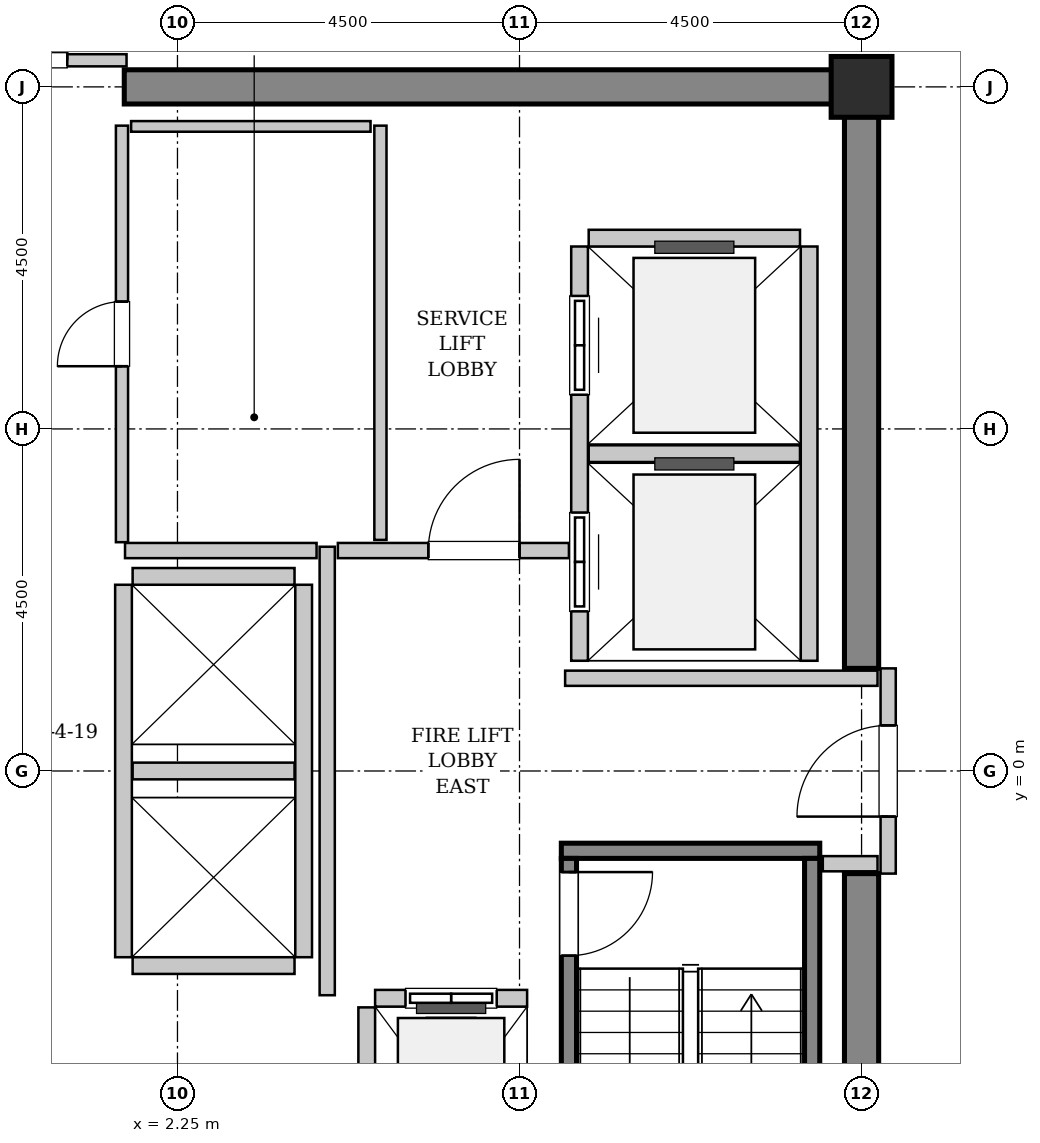
"""IFC4 building model, lengths in metres.
Left out: names, types, materials, properties, quantities, classifications, styles, units other than length and angle.
Written with IfcOpenShell. Run it as: python <this file> out.ifc"""

import sys

from ifc_helpers import new_model, si_unit, direction, frame, frame_2d, origin, origin_2d, place, context, subcontext, project, spatial, rectangle, hollow_rectangle, extrude, source, transform, mapped, element, fill, save


model = new_model("IFC4")
c1 = context("Model", 3, precision=1e-05, world=origin(), true_north=direction((0.0, 1.0)))
c2 = subcontext(c1, "Body", "Model", "MODEL_VIEW")
j1 = project(units=[si_unit("LENGTHUNIT", "METRE"), si_unit("PLANEANGLEUNIT", "RADIAN")], contexts=[c1])
p1 = place(None, origin())
s1 = spatial("IfcSite", under=j1, at=p1, CompositionType="ELEMENT")
p2 = place(p1, origin())
s2 = spatial("IfcBuilding", under=s1, at=p2, CompositionType="ELEMENT")
p3 = place(p2, frame((0.0, 0.0, 225.6)))
s3 = spatial("IfcBuildingStorey", under=s2, at=p3, CompositionType="ELEMENT", Elevation=225.6)
m1 = source(origin(), c2, "Body", "SweptSolid", [
    extrude(rectangle(XDim=9.925, YDim=0.45, at=frame_2d((4.962, 0.0))), origin(), (0.0, 0.0, 1.0), 3.8),
])
p4 = place(p3, frame((1.55, 9.0, 0.0), z_axis=(0.0, 0.0, 1.0), x_axis=(1.0, 0.0, 0.0)))
e1 = element("IfcWall", 1, at=p4, inside=s3, PredefinedType="SHEAR", context=c2, shape_type="MappedRepresentation", body=[
    mapped(m1, transform((0.0, 0.0, 0.0), x_axis=(1.0, 0.0, 0.0), y_axis=(0.0, 1.0, 0.0), z_axis=(0.0, 0.0, 1.0), scale=1.0)),
])
m2 = source(origin(), c2, "Body", "SweptSolid", [
    extrude(rectangle(XDim=7.425, YDim=0.45, at=frame_2d((3.712, 0.0))), origin(), (0.0, 0.0, 1.0), 3.8),
])
for number, where, z_axis, x_axis in (
    (2, (11.25, -8.775, 0.0), (0.0, 0.0, 1.0), (0.0, 1.0, 0.0)),
    (3, (11.25, 1.35, 0.0), (0.0, 0.0, 1.0), (0.0, 1.0, 0.0)),
):
    element("IfcWall", number, at=place(p3, frame(where, z_axis=z_axis, x_axis=x_axis)), inside=s3, PredefinedType="SHEAR", context=c2, shape_type="MappedRepresentation", body=[
        mapped(m2, transform((0.0, 0.0, 0.0), x_axis=(1.0, 0.0, 0.0), y_axis=(0.0, 1.0, 0.0), z_axis=(0.0, 0.0, 1.0), scale=1.0)),
    ])
m3 = source(origin(), c2, "Body", "SweptSolid", [
    extrude(hollow_rectangle(XDim=0.8, YDim=0.8, WallThickness=0.04, InnerFilletRadius=0.04, OuterFilletRadius=0.08, at=origin_2d()), origin(), (0.0, 0.0, 1.0), 3.8),
])
p5 = place(p3, frame((11.25, 9.0, 0.0), z_axis=(0.0, 0.0, 1.0), x_axis=(1.0, 0.0, 0.0)))
e4 = element("IfcColumn", 4, at=p5, inside=s3, PredefinedType="COLUMN", context=c2, shape_type="MappedRepresentation", body=[
    mapped(m3, transform((0.0, 0.0, 0.0), x_axis=(1.0, 0.0, 0.0), y_axis=(0.0, 1.0, 0.0), z_axis=(0.0, 0.0, 1.0), scale=1.0)),
])
m4 = source(origin(), c2, "Body", "SweptSolid", [
    extrude(rectangle(XDim=3.4, YDim=0.2, at=frame_2d((1.7, 0.0))), origin(), (0.0, 0.0, 1.0), 3.8),
])
p6 = place(p3, frame((7.3, -1.05, 0.0), z_axis=(0.0, 0.0, 1.0), x_axis=(1.0, 0.0, 0.0)))
e5 = element("IfcWall", 5, at=p6, inside=s3, PredefinedType="SOLIDWALL", context=c2, shape_type="MappedRepresentation", body=[
    mapped(m4, transform((0.0, 0.0, 0.0), x_axis=(1.0, 0.0, 0.0), y_axis=(0.0, 1.0, 0.0), z_axis=(0.0, 0.0, 1.0), scale=1.0)),
])
m5 = source(origin(), c2, "Body", "SweptSolid", [
    extrude(rectangle(XDim=7.1, YDim=0.2, at=frame_2d((3.55, 0.0))), origin(), (0.0, 0.0, 1.0), 3.8),
])
p7 = place(p3, frame((7.4, -1.15, 0.0), z_axis=(0.0, 0.0, 1.0), x_axis=(0.0, -1.0, 0.0)))
e6 = element("IfcWall", 6, at=p7, inside=s3, PredefinedType="SOLIDWALL", context=c2, shape_type="MappedRepresentation", body=[
    mapped(m5, transform((0.0, 0.0, 0.0), x_axis=(1.0, 0.0, 0.0), y_axis=(0.0, 1.0, 0.0), z_axis=(0.0, 0.0, 1.0), scale=1.0)),
])
p8 = place(p7, frame((0.18, 0.0, 0.0)))
e7 = element("IfcOpeningElement", 7, at=p8, cuts=e6, PredefinedType="OPENING", context=c2, shape_type="SweptSolid", body=[
    extrude(rectangle(XDim=1.1, YDim=2.15, at=frame_2d((0.55, 1.075))), frame((0.0, 0.11, 0.0), z_axis=(0.0, -1.0, 0.0), x_axis=(1.0, 0.0, 0.0)), (0.0, 0.0, 1.0), 0.22),
])
p9 = place(p3, frame((10.6, -1.15, 0.0), z_axis=(0.0, 0.0, 1.0), x_axis=(0.0, -1.0, 0.0)))
e8 = element("IfcWall", 8, at=p9, inside=s3, PredefinedType="SOLIDWALL", context=c2, shape_type="MappedRepresentation", body=[
    mapped(m5, transform((0.0, 0.0, 0.0), x_axis=(1.0, 0.0, 0.0), y_axis=(0.0, 1.0, 0.0), z_axis=(0.0, 0.0, 1.0), scale=1.0)),
])
m6 = source(origin(), c2, "Body", "SweptSolid", [
    extrude(rectangle(XDim=2.0, YDim=0.22, at=frame_2d((1.0, 0.0))), origin(), (0.0, 0.0, 1.0), 3.535),
])
p10 = place(p3, frame((6.85, -2.99, 0.0), z_axis=(0.0, 0.0, 1.0), x_axis=(-1.0, 0.0, 0.0)))
e9 = element("IfcWall", 9, at=p10, inside=s3, PredefinedType="SOLIDWALL", context=c2, shape_type="MappedRepresentation", body=[
    mapped(m6, transform((0.0, 0.0, 0.0), x_axis=(1.0, 0.0, 0.0), y_axis=(0.0, 1.0, 0.0), z_axis=(0.0, 0.0, 1.0), scale=1.0)),
])
p11 = place(p10, frame((0.4, 0.0, 0.0)))
e10 = element("IfcOpeningElement", 10, at=p11, cuts=e9, PredefinedType="OPENING", context=c2, shape_type="SweptSolid", body=[
    extrude(rectangle(XDim=1.2, YDim=2.2, at=frame_2d((0.6, 1.1))), frame((0.0, 0.12, 0.0), z_axis=(0.0, -1.0, 0.0), x_axis=(1.0, 0.0, 0.0)), (0.0, 0.0, 1.0), 0.24),
])
m7 = source(origin(), c2, "Body", "SweptSolid", [
    extrude(rectangle(XDim=2.68, YDim=0.22, at=frame_2d((1.34, 0.0))), origin(), (0.0, 0.0, 1.0), 3.535),
])
p12 = place(p3, frame((4.74, -3.11, 0.0), z_axis=(0.0, 0.0, 1.0), x_axis=(0.0, -1.0, 0.0)))
e11 = element("IfcWall", 11, at=p12, inside=s3, PredefinedType="SOLIDWALL", context=c2, shape_type="MappedRepresentation", body=[
    mapped(m7, transform((0.0, 0.0, 0.0), x_axis=(1.0, 0.0, 0.0), y_axis=(0.0, 1.0, 0.0), z_axis=(0.0, 0.0, 1.0), scale=1.0)),
])
m8 = source(origin(), c2, "Body", "SweptSolid", [
    extrude(rectangle(XDim=5.45, YDim=0.22, at=frame_2d((2.725, 0.0))), origin(), (0.0, 0.0, 1.0), 3.535),
])
p13 = place(p3, frame((7.54, 6.9, 0.0), z_axis=(0.0, 0.0, 1.0), x_axis=(0.0, -1.0, 0.0)))
e12 = element("IfcWall", 12, at=p13, inside=s3, PredefinedType="SOLIDWALL", context=c2, shape_type="MappedRepresentation", body=[
    mapped(m8, transform((0.0, 0.0, 0.0), x_axis=(1.0, 0.0, 0.0), y_axis=(0.0, 1.0, 0.0), z_axis=(0.0, 0.0, 1.0), scale=1.0)),
])
p14 = place(p13, frame((3.5, 0.0, 0.0)))
e13 = element("IfcOpeningElement", 13, at=p14, cuts=e12, PredefinedType="OPENING", context=c2, shape_type="SweptSolid", body=[
    extrude(rectangle(XDim=1.3, YDim=2.3, at=frame_2d((0.65, 1.15))), frame((0.0, 0.12, 0.0), z_axis=(0.0, -1.0, 0.0), x_axis=(1.0, 0.0, 0.0)), (0.0, 0.0, 1.0), 0.24),
])
p15 = place(p13, frame((0.65, 0.0, 0.0)))
e14 = element("IfcOpeningElement", 14, at=p15, cuts=e12, PredefinedType="OPENING", context=c2, shape_type="SweptSolid", body=[
    extrude(rectangle(XDim=1.3, YDim=2.3, at=frame_2d((0.65, 1.15))), frame((0.0, 0.12, 0.0), z_axis=(0.0, -1.0, 0.0), x_axis=(1.0, 0.0, 0.0)), (0.0, 0.0, 1.0), 0.24),
])
p16 = place(p3, frame((10.56, 1.45, 0.0), z_axis=(0.0, 0.0, 1.0), x_axis=(0.0, 1.0, 0.0)))
e15 = element("IfcWall", 15, at=p16, inside=s3, PredefinedType="SOLIDWALL", context=c2, shape_type="MappedRepresentation", body=[
    mapped(m8, transform((0.0, 0.0, 0.0), x_axis=(1.0, 0.0, 0.0), y_axis=(0.0, 1.0, 0.0), z_axis=(0.0, 0.0, 1.0), scale=1.0)),
])
m9 = source(origin(), c2, "Body", "SweptSolid", [
    extrude(rectangle(XDim=2.78, YDim=0.22, at=frame_2d((1.39, 0.0))), origin(), (0.0, 0.0, 1.0), 3.535),
])
for number, where, z_axis, x_axis in (
    (16, (7.66, 4.175, 0.0), (0.0, 0.0, 1.0), (1.0, 0.0, 0.0)),
    (17, (10.44, 7.01, 0.0), (0.0, 0.0, 1.0), (-1.0, 0.0, 0.0)),
):
    element("IfcWall", number, at=place(p3, frame(where, z_axis=z_axis, x_axis=x_axis)), inside=s3, PredefinedType="SOLIDWALL", context=c2, shape_type="MappedRepresentation", body=[
        mapped(m9, transform((0.0, 0.0, 0.0), x_axis=(1.0, 0.0, 0.0), y_axis=(0.0, 1.0, 0.0), z_axis=(0.0, 0.0, 1.0), scale=1.0)),
    ])
m10 = source(origin(), c2, "Body", "SweptSolid", [
    extrude(rectangle(XDim=4.9, YDim=0.22, at=frame_2d((2.45, 0.0))), origin(), (0.0, 0.0, 1.0), 3.535),
])
for number, where, z_axis, x_axis in (
    (18, (1.54, 2.45, 0.0), (0.0, 0.0, 1.0), (0.0, -1.0, 0.0)),
    (19, (3.91, -2.45, 0.0), (0.0, 0.0, 1.0), (0.0, 1.0, 0.0)),
):
    element("IfcWall", number, at=place(p3, frame(where, z_axis=z_axis, x_axis=x_axis)), inside=s3, PredefinedType="SOLIDWALL", context=c2, shape_type="MappedRepresentation", body=[
        mapped(m10, transform((0.0, 0.0, 0.0), x_axis=(1.0, 0.0, 0.0), y_axis=(0.0, 1.0, 0.0), z_axis=(0.0, 0.0, 1.0), scale=1.0)),
    ])
m11 = source(origin(), c2, "Body", "SweptSolid", [
    extrude(rectangle(XDim=2.13, YDim=0.22, at=frame_2d((1.065, 0.0))), origin(), (0.0, 0.0, 1.0), 3.535),
])
for number, where, z_axis, x_axis in (
    (20, (1.66, -2.56, 0.0), (0.0, 0.0, 1.0), (1.0, 0.0, 0.0)),
    (21, (1.66, 0.0, 0.0), (0.0, 0.0, 1.0), (1.0, 0.0, 0.0)),
    (22, (3.79, 2.56, 0.0), (0.0, 0.0, 1.0), (-1.0, 0.0, 0.0)),
):
    element("IfcWall", number, at=place(p3, frame(where, z_axis=z_axis, x_axis=x_axis)), inside=s3, PredefinedType="SOLIDWALL", context=c2, shape_type="MappedRepresentation", body=[
        mapped(m11, transform((0.0, 0.0, 0.0), x_axis=(1.0, 0.0, 0.0), y_axis=(0.0, 1.0, 0.0), z_axis=(0.0, 0.0, 1.0), scale=1.0)),
    ])
m12 = source(origin(), c2, "Body", "SweptSolid", [
    extrude(rectangle(XDim=2.7, YDim=0.2, at=frame_2d((1.35, 0.0))), origin(), (0.0, 0.0, 1.0), 2.625),
])
p17 = place(p3, frame((11.6, -1.35, 0.0), z_axis=(0.0, 0.0, 1.0), x_axis=(0.0, 1.0, 0.0)))
e23 = element("IfcWall", 23, at=p17, inside=s3, PredefinedType="PARTITIONING", context=c2, shape_type="MappedRepresentation", body=[
    mapped(m12, transform((0.0, 0.0, 0.0), x_axis=(1.0, 0.0, 0.0), y_axis=(0.0, 1.0, 0.0), z_axis=(0.0, 0.0, 1.0), scale=1.0)),
])
p18 = place(p17, frame((0.75, 0.0, 0.0)))
e24 = element("IfcOpeningElement", 24, at=p18, cuts=e23, PredefinedType="OPENING", context=c2, shape_type="SweptSolid", body=[
    extrude(rectangle(XDim=1.2, YDim=2.15, at=frame_2d((0.6, 1.075))), frame((0.0, 0.11, 0.0), z_axis=(0.0, -1.0, 0.0), x_axis=(1.0, 0.0, 0.0)), (0.0, 0.0, 1.0), 0.22),
])
m13 = source(origin(), c2, "Body", "SweptSolid", [
    extrude(rectangle(XDim=5.9, YDim=0.2, at=frame_2d((2.95, 0.0))), origin(), (0.0, 0.0, 1.0), 3.535),
])
p19 = place(p3, frame((4.22, -2.95, 0.0), z_axis=(0.0, 0.0, 1.0), x_axis=(0.0, 1.0, 0.0)))
e25 = element("IfcWall", 25, at=p19, inside=s3, PredefinedType="PARTITIONING", context=c2, shape_type="MappedRepresentation", body=[
    mapped(m13, transform((0.0, 0.0, 0.0), x_axis=(1.0, 0.0, 0.0), y_axis=(0.0, 1.0, 0.0), z_axis=(0.0, 0.0, 1.0), scale=1.0)),
])
m14 = source(origin(), c2, "Body", "SweptSolid", [
    extrude(rectangle(XDim=2.52, YDim=0.2, at=frame_2d((1.26, 0.0))), origin(), (0.0, 0.0, 1.0), 3.535),
])
p20 = place(p3, frame((1.56, 2.9, 0.0), z_axis=(0.0, 0.0, 1.0), x_axis=(1.0, 0.0, 0.0)))
e26 = element("IfcWall", 26, at=p20, inside=s3, PredefinedType="PARTITIONING", context=c2, shape_type="MappedRepresentation", body=[
    mapped(m14, transform((0.0, 0.0, 0.0), x_axis=(1.0, 0.0, 0.0), y_axis=(0.0, 1.0, 0.0), z_axis=(0.0, 0.0, 1.0), scale=1.0)),
])
m15 = source(origin(), c2, "Body", "SweptSolid", [
    extrude(rectangle(XDim=3.04, YDim=0.2, at=frame_2d((1.52, 0.0))), origin(), (0.0, 0.0, 1.0), 3.535),
])
p21 = place(p3, frame((4.36, 2.9, 0.0), z_axis=(0.0, 0.0, 1.0), x_axis=(1.0, 0.0, 0.0)))
e27 = element("IfcWall", 27, at=p21, inside=s3, PredefinedType="PARTITIONING", context=c2, shape_type="MappedRepresentation", body=[
    mapped(m15, transform((0.0, 0.0, 0.0), x_axis=(1.0, 0.0, 0.0), y_axis=(0.0, 1.0, 0.0), z_axis=(0.0, 0.0, 1.0), scale=1.0)),
])
p22 = place(p21, frame((1.19, 0.0, 0.0)))
e28 = element("IfcOpeningElement", 28, at=p22, cuts=e27, PredefinedType="OPENING", context=c2, shape_type="SweptSolid", body=[
    extrude(rectangle(XDim=1.2, YDim=2.15, at=frame_2d((0.6, 1.075))), frame((0.0, 0.11, 0.0), z_axis=(0.0, -1.0, 0.0), x_axis=(1.0, 0.0, 0.0)), (0.0, 0.0, 1.0), 0.22),
])
m16 = source(origin(), c2, "Body", "SweptSolid", [
    extrude(rectangle(XDim=4.11, YDim=0.2, at=frame_2d((2.055, 0.0))), origin(), (0.0, 0.0, 1.0), 3.535),
])
p23 = place(p3, frame((7.35, 1.22, 0.0), z_axis=(0.0, 0.0, 1.0), x_axis=(1.0, 0.0, 0.0)))
e29 = element("IfcWall", 29, at=p23, inside=s3, PredefinedType="PARTITIONING", context=c2, shape_type="MappedRepresentation", body=[
    mapped(m16, transform((0.0, 0.0, 0.0), x_axis=(1.0, 0.0, 0.0), y_axis=(0.0, 1.0, 0.0), z_axis=(0.0, 0.0, 1.0), scale=1.0)),
])
m17 = source(origin(), c2, "Body", "SweptSolid", [
    extrude(rectangle(XDim=0.72, YDim=0.2, at=frame_2d((0.36, 0.0))), origin(), (0.0, 0.0, 1.0), 3.535),
])
p24 = place(p3, frame((10.74, -1.22, 0.0), z_axis=(0.0, 0.0, 1.0), x_axis=(1.0, 0.0, 0.0)))
e30 = element("IfcWall", 30, at=p24, inside=s3, PredefinedType="PARTITIONING", context=c2, shape_type="MappedRepresentation", body=[
    mapped(m17, transform((0.0, 0.0, 0.0), x_axis=(1.0, 0.0, 0.0), y_axis=(0.0, 1.0, 0.0), z_axis=(0.0, 0.0, 1.0), scale=1.0)),
])
m18 = source(origin(), c2, "Body", "SweptSolid", [
    extrude(rectangle(XDim=3.16, YDim=0.16, at=frame_2d((1.58, 0.0))), origin(), (0.0, 0.0, 1.0), 2.625),
])
p25 = place(p3, frame((-1.58, 9.35, 0.0), z_axis=(0.0, 0.0, 1.0), x_axis=(1.0, 0.0, 0.0)))
e31 = element("IfcWall", 31, at=p25, inside=s3, PredefinedType="PARTITIONING", context=c2, shape_type="MappedRepresentation", body=[
    mapped(m18, transform((0.0, 0.0, 0.0), x_axis=(1.0, 0.0, 0.0), y_axis=(0.0, 1.0, 0.0), z_axis=(0.0, 0.0, 1.0), scale=1.0)),
])
p26 = place(p25, frame((0.78, 0.0, 0.0)))
e32 = element("IfcOpeningElement", 32, at=p26, cuts=e31, PredefinedType="OPENING", context=c2, shape_type="SweptSolid", body=[
    extrude(rectangle(XDim=1.6, YDim=2.3, at=frame_2d((0.8, 1.15))), frame((0.0, 0.09, 0.0), z_axis=(0.0, -1.0, 0.0), x_axis=(1.0, 0.0, 0.0)), (0.0, 0.0, 1.0), 0.18),
])
m19 = source(origin(), c2, "Body", "SweptSolid", [
    extrude(rectangle(XDim=5.45, YDim=0.16, at=frame_2d((2.725, 0.0))), origin(), (0.0, 0.0, 1.0), 3.535),
])
p27 = place(p3, frame((4.92, 3.04, 0.0), z_axis=(0.0, 0.0, 1.0), x_axis=(0.0, 1.0, 0.0)))
e33 = element("IfcWall", 33, at=p27, inside=s3, PredefinedType="PARTITIONING", context=c2, shape_type="MappedRepresentation", body=[
    mapped(m19, transform((0.0, 0.0, 0.0), x_axis=(1.0, 0.0, 0.0), y_axis=(0.0, 1.0, 0.0), z_axis=(0.0, 0.0, 1.0), scale=1.0)),
])
m20 = source(origin(), c2, "Body", "SweptSolid", [
    extrude(rectangle(XDim=5.48, YDim=0.16, at=frame_2d((2.74, 0.0))), origin(), (0.0, 0.0, 1.0), 3.535),
])
p28 = place(p3, frame((1.52, 3.01, 0.0), z_axis=(0.0, 0.0, 1.0), x_axis=(0.0, 1.0, 0.0)))
e34 = element("IfcWall", 34, at=p28, inside=s3, PredefinedType="PARTITIONING", context=c2, shape_type="MappedRepresentation", body=[
    mapped(m20, transform((0.0, 0.0, 0.0), x_axis=(1.0, 0.0, 0.0), y_axis=(0.0, 1.0, 0.0), z_axis=(0.0, 0.0, 1.0), scale=1.0)),
])
p29 = place(p28, frame((2.315, 0.0, 0.0)))
e35 = element("IfcOpeningElement", 35, at=p29, cuts=e34, PredefinedType="OPENING", context=c2, shape_type="SweptSolid", body=[
    extrude(rectangle(XDim=0.85, YDim=2.1, at=frame_2d((0.425, 1.05))), frame((0.0, 0.09, 0.0), z_axis=(0.0, -1.0, 0.0), x_axis=(1.0, 0.0, 0.0)), (0.0, 0.0, 1.0), 0.18),
])
m21 = source(origin(), c2, "Body", "SweptSolid", [
    extrude(rectangle(XDim=3.15, YDim=0.14, at=frame_2d((1.575, 0.0))), origin(), (0.0, 0.0, 1.0), 3.535),
])
p30 = place(p3, frame((1.64, 8.48, 0.0), z_axis=(0.0, 0.0, 1.0), x_axis=(1.0, 0.0, 0.0)))
e36 = element("IfcWall", 36, at=p30, inside=s3, PredefinedType="PARTITIONING", context=c2, shape_type="MappedRepresentation", body=[
    mapped(m21, transform((0.0, 0.0, 0.0), x_axis=(1.0, 0.0, 0.0), y_axis=(0.0, 1.0, 0.0), z_axis=(0.0, 0.0, 1.0), scale=1.0)),
])
m22 = source(origin(), c2, "Body", "SweptSolid", [
    extrude(rectangle(XDim=1.1, YDim=2.15, at=frame_2d((0.55, 1.075))), frame((0.0, 0.025, 0.0), z_axis=(0.0, -1.0, 0.0), x_axis=(1.0, 0.0, 0.0)), (0.0, 0.0, 1.0), 0.05),
])
p31 = place(p8, origin())
e37 = element("IfcDoor", 37, at=p31, inside=s3, OperationType="SINGLE_SWING_LEFT", PredefinedType="DOOR", context=c2, shape_type="MappedRepresentation", body=[
    mapped(m22, transform((0.0, 0.0, 0.0), x_axis=(1.0, 0.0, 0.0), y_axis=(0.0, 1.0, 0.0), z_axis=(0.0, 0.0, 1.0), scale=1.0)),
])
fill(e7, e37)
m23 = source(origin(), c2, "Body", "SweptSolid", [
    extrude(rectangle(XDim=1.2, YDim=2.2, at=frame_2d((0.6, 1.1))), frame((0.0, 0.025, 0.0), z_axis=(0.0, -1.0, 0.0), x_axis=(1.0, 0.0, 0.0)), (0.0, 0.0, 1.0), 0.05),
])
p32 = place(p11, origin())
e38 = element("IfcDoor", 38, at=p32, inside=s3, OperationType="SLIDING_TO_LEFT", PredefinedType="DOOR", context=c2, shape_type="MappedRepresentation", body=[
    mapped(m23, transform((0.0, 0.0, 0.0), x_axis=(1.0, 0.0, 0.0), y_axis=(0.0, 1.0, 0.0), z_axis=(0.0, 0.0, 1.0), scale=1.0)),
])
fill(e10, e38)
m24 = source(origin(), c2, "Body", "SweptSolid", [
    extrude(rectangle(XDim=1.3, YDim=2.3, at=frame_2d((0.65, 1.15))), frame((0.0, 0.025, 0.0), z_axis=(0.0, -1.0, 0.0), x_axis=(1.0, 0.0, 0.0)), (0.0, 0.0, 1.0), 0.05),
])
p33 = place(p14, origin())
e39 = element("IfcDoor", 39, at=p33, inside=s3, OperationType="SLIDING_TO_RIGHT", PredefinedType="DOOR", context=c2, shape_type="MappedRepresentation", body=[
    mapped(m24, transform((0.0, 0.0, 0.0), x_axis=(1.0, 0.0, 0.0), y_axis=(0.0, 1.0, 0.0), z_axis=(0.0, 0.0, 1.0), scale=1.0)),
])
fill(e13, e39)
p34 = place(p15, origin())
e40 = element("IfcDoor", 40, at=p34, inside=s3, OperationType="SLIDING_TO_RIGHT", PredefinedType="DOOR", context=c2, shape_type="MappedRepresentation", body=[
    mapped(m24, transform((0.0, 0.0, 0.0), x_axis=(1.0, 0.0, 0.0), y_axis=(0.0, 1.0, 0.0), z_axis=(0.0, 0.0, 1.0), scale=1.0)),
])
fill(e14, e40)
m25 = source(origin(), c2, "Body", "SweptSolid", [
    extrude(rectangle(XDim=1.2, YDim=2.15, at=frame_2d((0.6, 1.075))), frame((0.0, 0.025, 0.0), z_axis=(0.0, -1.0, 0.0), x_axis=(1.0, 0.0, 0.0)), (0.0, 0.0, 1.0), 0.05),
])
p35 = place(p18, origin())
e41 = element("IfcDoor", 41, at=p35, inside=s3, OperationType="SINGLE_SWING_LEFT", PredefinedType="DOOR", context=c2, shape_type="MappedRepresentation", body=[
    mapped(m25, transform((0.0, 0.0, 0.0), x_axis=(1.0, 0.0, 0.0), y_axis=(0.0, 1.0, 0.0), z_axis=(0.0, 0.0, 1.0), scale=1.0)),
])
fill(e24, e41)
p36 = place(p22, origin())
e42 = element("IfcDoor", 42, at=p36, inside=s3, OperationType="SINGLE_SWING_RIGHT", PredefinedType="DOOR", context=c2, shape_type="MappedRepresentation", body=[
    mapped(m25, transform((0.0, 0.0, 0.0), x_axis=(1.0, 0.0, 0.0), y_axis=(0.0, 1.0, 0.0), z_axis=(0.0, 0.0, 1.0), scale=1.0)),
])
fill(e28, e42)
m26 = source(origin(), c2, "Body", "SweptSolid", [
    extrude(rectangle(XDim=1.6, YDim=2.3, at=frame_2d((0.8, 1.15))), frame((0.0, 0.025, 0.0), z_axis=(0.0, -1.0, 0.0), x_axis=(1.0, 0.0, 0.0)), (0.0, 0.0, 1.0), 0.05),
])
p37 = place(p26, origin())
e43 = element("IfcDoor", 43, at=p37, inside=s3, OperationType="DOUBLE_DOOR_SINGLE_SWING", PredefinedType="DOOR", context=c2, shape_type="MappedRepresentation", body=[
    mapped(m26, transform((0.0, 0.0, 0.0), x_axis=(1.0, 0.0, 0.0), y_axis=(0.0, 1.0, 0.0), z_axis=(0.0, 0.0, 1.0), scale=1.0)),
])
fill(e32, e43)
m27 = source(origin(), c2, "Body", "SweptSolid", [
    extrude(rectangle(XDim=0.85, YDim=2.1, at=frame_2d((0.425, 1.05))), frame((0.0, 0.025, 0.0), z_axis=(0.0, -1.0, 0.0), x_axis=(1.0, 0.0, 0.0)), (0.0, 0.0, 1.0), 0.05),
])
p38 = place(p29, origin())
e44 = element("IfcDoor", 44, at=p38, inside=s3, OperationType="SINGLE_SWING_LEFT", PredefinedType="DOOR", context=c2, shape_type="MappedRepresentation", body=[
    mapped(m27, transform((0.0, 0.0, 0.0), x_axis=(1.0, 0.0, 0.0), y_axis=(0.0, 1.0, 0.0), z_axis=(0.0, 0.0, 1.0), scale=1.0)),
])
fill(e35, e44)
save(model, sys.argv[1])
